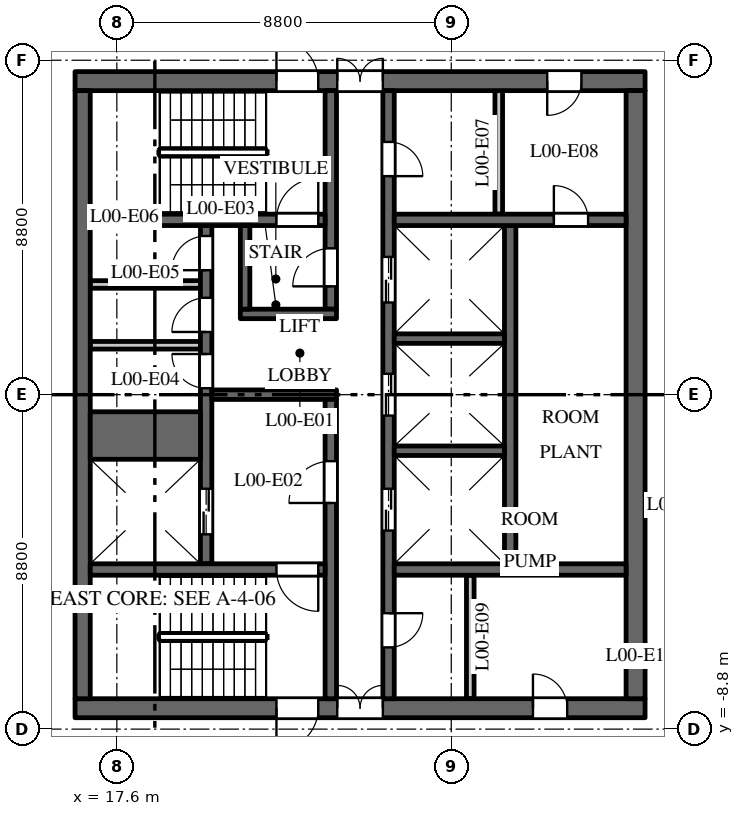
"""IFC4 building model, lengths in metres.
Left out: names, types, materials, properties, quantities, classifications, styles, units other than length and angle.
Written with IfcOpenShell. Run it as: python <this file> out.ifc"""

import sys

from ifc_helpers import new_model, si_unit, direction, frame, frame_2d, origin, place, context, subcontext, project, spatial, rectangle, extrude, element, fill, save


model = new_model("IFC4")
c1 = context("Model", 3, precision=1e-05, world=origin(), true_north=direction((0.0, 1.0)))
c2 = subcontext(c1, "Body", "Model", "MODEL_VIEW")
j1 = project(units=[si_unit("LENGTHUNIT", "METRE"), si_unit("PLANEANGLEUNIT", "RADIAN")], contexts=[c1])
p1 = place(None, origin())
s1 = spatial("IfcSite", under=j1, at=p1, CompositionType="ELEMENT")
p2 = place(p1, origin())
s2 = spatial("IfcBuilding", under=s1, at=p2, CompositionType="ELEMENT")
p3 = place(p2, origin())
s3 = spatial("IfcBuildingStorey", under=s2, at=p3, CompositionType="ELEMENT", Elevation=0.0)
p4 = place(p3, frame((16.5, 8.25, 0.0), z_axis=(0.0, 0.0, 1.0), x_axis=(1.0, 0.0, 0.0)))
e1 = element("IfcWall", 1, at=p4, inside=s3, PredefinedType="SHEAR", context=c2, shape_type="SweptSolid", body=[
    extrude(rectangle(XDim=15.0, YDim=0.5, at=frame_2d((7.5, 0.0))), origin(), (0.0, 0.0, 1.0), 7.25),
])
p5 = place(p4, frame((6.9, 0.0, 0.0)))
e2 = element("IfcOpeningElement", 2, at=p5, cuts=e1, PredefinedType="OPENING", context=c2, shape_type="SweptSolid", body=[
    extrude(rectangle(XDim=1.2, YDim=2.1, at=frame_2d((0.6, 1.05))), frame((0.0, 0.26, 0.0), z_axis=(0.0, -1.0, 0.0), x_axis=(1.0, 0.0, 0.0)), (0.0, 0.0, 1.0), 0.52),
])
p6 = place(p4, frame((5.3, 0.0, 0.0)))
e3 = element("IfcOpeningElement", 3, at=p6, cuts=e1, PredefinedType="OPENING", context=c2, shape_type="SweptSolid", body=[
    extrude(rectangle(XDim=1.1, YDim=2.1, at=frame_2d((0.55, 1.05))), frame((0.0, 0.26, 0.0), z_axis=(0.0, -1.0, 0.0), x_axis=(1.0, 0.0, 0.0)), (0.0, 0.0, 1.0), 0.52),
])
p7 = place(p4, frame((12.425, 0.0, 0.0)))
e4 = element("IfcOpeningElement", 4, at=p7, cuts=e1, PredefinedType="OPENING", context=c2, shape_type="SweptSolid", body=[
    extrude(rectangle(XDim=0.9, YDim=2.1, at=frame_2d((0.45, 1.05))), frame((0.0, 0.26, 0.0), z_axis=(0.0, -1.0, 0.0), x_axis=(1.0, 0.0, 0.0)), (0.0, 0.0, 1.0), 0.52),
])
p8 = place(p3, frame((16.5, -8.25, 0.0), z_axis=(0.0, 0.0, 1.0), x_axis=(1.0, 0.0, 0.0)))
e5 = element("IfcWall", 5, at=p8, inside=s3, PredefinedType="SHEAR", context=c2, shape_type="SweptSolid", body=[
    extrude(rectangle(XDim=15.0, YDim=0.5, at=frame_2d((7.5, 0.0))), origin(), (0.0, 0.0, 1.0), 7.25),
])
p9 = place(p8, frame((6.9, 0.0, 0.0)))
e6 = element("IfcOpeningElement", 6, at=p9, cuts=e5, PredefinedType="OPENING", context=c2, shape_type="SweptSolid", body=[
    extrude(rectangle(XDim=1.2, YDim=2.1, at=frame_2d((0.6, 1.05))), frame((0.0, 0.26, 0.0), z_axis=(0.0, -1.0, 0.0), x_axis=(1.0, 0.0, 0.0)), (0.0, 0.0, 1.0), 0.52),
])
p10 = place(p8, frame((5.3, 0.0, 0.0)))
e7 = element("IfcOpeningElement", 7, at=p10, cuts=e5, PredefinedType="OPENING", context=c2, shape_type="SweptSolid", body=[
    extrude(rectangle(XDim=1.1, YDim=2.1, at=frame_2d((0.55, 1.05))), frame((0.0, 0.26, 0.0), z_axis=(0.0, -1.0, 0.0), x_axis=(1.0, 0.0, 0.0)), (0.0, 0.0, 1.0), 0.52),
])
p11 = place(p8, frame((12.05, 0.0, 0.0)))
e8 = element("IfcOpeningElement", 8, at=p11, cuts=e5, PredefinedType="OPENING", context=c2, shape_type="SweptSolid", body=[
    extrude(rectangle(XDim=0.9, YDim=2.1, at=frame_2d((0.45, 1.05))), frame((0.0, 0.26, 0.0), z_axis=(0.0, -1.0, 0.0), x_axis=(1.0, 0.0, 0.0)), (0.0, 0.0, 1.0), 0.52),
])
for number, where, z_axis, x_axis in (
    (9, (16.9, 1.3, 0.0), (0.0, 0.0, 1.0), (1.0, 0.0, 0.0)),
    (10, (16.9, 2.9, 0.0), (0.0, 0.0, 1.0), (1.0, 0.0, 0.0)),
):
    element("IfcWall", number, at=place(p3, frame(where, z_axis=z_axis, x_axis=x_axis)), inside=s3, PredefinedType="PARTITIONING", context=c2, shape_type="SweptSolid", body=[
        extrude(rectangle(XDim=2.9, YDim=0.2, at=frame_2d((1.45, 0.0))), origin(), (0.0, 0.0, 1.0), 7.25),
    ])
p12 = place(p3, frame((27.95, -4.45, 0.0), z_axis=(0.0, 0.0, 1.0), x_axis=(0.0, 1.0, 0.0)))
e11 = element("IfcWall", 11, at=p12, inside=s3, PredefinedType="SHEAR", context=c2, shape_type="SweptSolid", body=[
    extrude(rectangle(XDim=8.9, YDim=0.3, at=frame_2d((4.45, 0.0))), origin(), (0.0, 0.0, 1.0), 7.25),
])
p13 = place(p3, frame((19.95, -4.45, 0.0), z_axis=(0.0, 0.0, 1.0), x_axis=(0.0, 1.0, 0.0)))
e12 = element("IfcWall", 12, at=p13, inside=s3, PredefinedType="SHEAR", context=c2, shape_type="SweptSolid", body=[
    extrude(rectangle(XDim=8.9, YDim=0.3, at=frame_2d((4.45, 0.0))), origin(), (0.0, 0.0, 1.0), 7.25),
])
p14 = place(p13, frame((0.775, 0.0, 0.0)))
e13 = element("IfcOpeningElement", 13, at=p14, cuts=e12, PredefinedType="OPENING", context=c2, shape_type="SweptSolid", body=[
    extrude(rectangle(XDim=1.2, YDim=2.1, at=frame_2d((0.6, 1.05))), frame((0.0, 0.16, 0.0), z_axis=(0.0, -1.0, 0.0), x_axis=(1.0, 0.0, 0.0)), (0.0, 0.0, 1.0), 0.32),
])
p15 = place(p13, frame((4.62, 0.0, 0.0)))
e14 = element("IfcOpeningElement", 14, at=p15, cuts=e12, PredefinedType="OPENING", context=c2, shape_type="SweptSolid", body=[
    extrude(rectangle(XDim=0.9, YDim=2.1, at=frame_2d((0.45, 1.05))), frame((0.0, 0.16, 0.0), z_axis=(0.0, -1.0, 0.0), x_axis=(1.0, 0.0, 0.0)), (0.0, 0.0, 1.0), 0.32),
])
p16 = place(p13, frame((6.1, 0.0, 0.0)))
e15 = element("IfcOpeningElement", 15, at=p16, cuts=e12, PredefinedType="OPENING", context=c2, shape_type="SweptSolid", body=[
    extrude(rectangle(XDim=0.9, YDim=2.1, at=frame_2d((0.45, 1.05))), frame((0.0, 0.16, 0.0), z_axis=(0.0, -1.0, 0.0), x_axis=(1.0, 0.0, 0.0)), (0.0, 0.0, 1.0), 0.32),
])
p17 = place(p13, frame((7.725, 0.0, 0.0)))
e16 = element("IfcOpeningElement", 16, at=p17, cuts=e12, PredefinedType="OPENING", context=c2, shape_type="SweptSolid", body=[
    extrude(rectangle(XDim=0.9, YDim=2.1, at=frame_2d((0.45, 1.05))), frame((0.0, 0.16, 0.0), z_axis=(0.0, -1.0, 0.0), x_axis=(1.0, 0.0, 0.0)), (0.0, 0.0, 1.0), 0.32),
])
p18 = place(p3, frame((24.75, -8.0, 0.0), z_axis=(0.0, 0.0, 1.0), x_axis=(0.0, 1.0, 0.0)))
e17 = element("IfcWall", 17, at=p18, inside=s3, PredefinedType="SHEAR", context=c2, shape_type="SweptSolid", body=[
    extrude(rectangle(XDim=16.0, YDim=0.3, at=frame_2d((8.0, 0.0))), origin(), (0.0, 0.0, 1.0), 7.25),
])
p19 = place(p18, frame((4.425, 0.0, 0.0)))
e18 = element("IfcOpeningElement", 18, at=p19, cuts=e17, PredefinedType="OPENING", context=c2, shape_type="SweptSolid", body=[
    extrude(rectangle(XDim=1.1, YDim=2.1, at=frame_2d((0.55, 1.05))), frame((0.0, 0.16, 0.0), z_axis=(0.0, -1.0, 0.0), x_axis=(1.0, 0.0, 0.0)), (0.0, 0.0, 1.0), 0.32),
])
p20 = place(p18, frame((7.45, 0.0, 0.0)))
e19 = element("IfcOpeningElement", 19, at=p20, cuts=e17, PredefinedType="OPENING", context=c2, shape_type="SweptSolid", body=[
    extrude(rectangle(XDim=1.1, YDim=2.1, at=frame_2d((0.55, 1.05))), frame((0.0, 0.16, 0.0), z_axis=(0.0, -1.0, 0.0), x_axis=(1.0, 0.0, 0.0)), (0.0, 0.0, 1.0), 0.32),
])
p21 = place(p18, frame((10.425, 0.0, 0.0)))
e20 = element("IfcOpeningElement", 20, at=p21, cuts=e17, PredefinedType="OPENING", context=c2, shape_type="SweptSolid", body=[
    extrude(rectangle(XDim=1.2, YDim=2.1, at=frame_2d((0.6, 1.05))), frame((0.0, 0.16, 0.0), z_axis=(0.0, -1.0, 0.0), x_axis=(1.0, 0.0, 0.0)), (0.0, 0.0, 1.0), 0.32),
])
p22 = place(p18, frame((13.75, 0.0, 0.0)))
e21 = element("IfcOpeningElement", 21, at=p22, cuts=e17, PredefinedType="OPENING", context=c2, shape_type="SweptSolid", body=[
    extrude(rectangle(XDim=0.9, YDim=2.1, at=frame_2d((0.45, 1.05))), frame((0.0, 0.16, 0.0), z_axis=(0.0, -1.0, 0.0), x_axis=(1.0, 0.0, 0.0)), (0.0, 0.0, 1.0), 0.32),
])
p23 = place(p18, frame((1.35, 0.0, 0.0)))
e22 = element("IfcOpeningElement", 22, at=p23, cuts=e17, PredefinedType="OPENING", context=c2, shape_type="SweptSolid", body=[
    extrude(rectangle(XDim=0.9, YDim=2.1, at=frame_2d((0.45, 1.05))), frame((0.0, 0.16, 0.0), z_axis=(0.0, -1.0, 0.0), x_axis=(1.0, 0.0, 0.0)), (0.0, 0.0, 1.0), 0.32),
])
p24 = place(p3, frame((20.1, 0.0, 0.0), z_axis=(0.0, 0.0, 1.0), x_axis=(1.0, 0.0, 0.0)))
e23 = element("IfcWall", 23, at=p24, inside=s3, PredefinedType="SHEAR", context=c2, shape_type="SweptSolid", body=[
    extrude(rectangle(XDim=3.28, YDim=0.25, at=frame_2d((1.64, 0.0))), origin(), (0.0, 0.0, 1.0), 7.25),
])
p25 = place(p3, frame((16.7, -8.0, 0.0), z_axis=(0.0, 0.0, 1.0), x_axis=(0.0, 1.0, 0.0)))
e24 = element("IfcWall", 24, at=p25, inside=s3, PredefinedType="SHEAR", context=c2, shape_type="SweptSolid", body=[
    extrude(rectangle(XDim=16.0, YDim=0.4, at=frame_2d((8.0, 0.0))), origin(), (0.0, 0.0, 1.0), 7.25),
])
p26 = place(p3, frame((31.25, -8.0, 0.0), z_axis=(0.0, 0.0, 1.0), x_axis=(0.0, 1.0, 0.0)))
e25 = element("IfcWall", 25, at=p26, inside=s3, PredefinedType="SHEAR", context=c2, shape_type="SweptSolid", body=[
    extrude(rectangle(XDim=16.0, YDim=0.5, at=frame_2d((8.0, 0.0))), origin(), (0.0, 0.0, 1.0), 7.25),
])
p27 = place(p3, frame((24.9, 4.6, 0.0), z_axis=(0.0, 0.0, 1.0), x_axis=(1.0, 0.0, 0.0)))
e26 = element("IfcWall", 26, at=p27, inside=s3, PredefinedType="SHEAR", context=c2, shape_type="SweptSolid", body=[
    extrude(rectangle(XDim=6.1, YDim=0.3, at=frame_2d((3.05, 0.0))), origin(), (0.0, 0.0, 1.0), 7.25),
])
p28 = place(p27, frame((4.2, 0.0, 0.0)))
e27 = element("IfcOpeningElement", 27, at=p28, cuts=e26, PredefinedType="OPENING", context=c2, shape_type="SweptSolid", body=[
    extrude(rectangle(XDim=0.9, YDim=2.1, at=frame_2d((0.45, 1.05))), frame((0.0, 0.16, 0.0), z_axis=(0.0, -1.0, 0.0), x_axis=(1.0, 0.0, 0.0)), (0.0, 0.0, 1.0), 0.32),
])
for number, where, z_axis, x_axis in (
    (28, (27.65, 4.75, 0.0), (0.0, 0.0, 1.0), (0.0, 1.0, 0.0)),
    (29, (26.9, -8.0, 0.0), (0.0, 0.0, 1.0), (0.0, 1.0, 0.0)),
):
    element("IfcWall", number, at=place(p3, frame(where, z_axis=z_axis, x_axis=x_axis)), inside=s3, PredefinedType="PARTITIONING", context=c2, shape_type="SweptSolid", body=[
        extrude(rectangle(XDim=3.25, YDim=0.2, at=frame_2d((1.625, 0.0))), origin(), (0.0, 0.0, 1.0), 7.25),
    ])
p29 = place(p3, frame((24.9, -4.6, 0.0), z_axis=(0.0, 0.0, 1.0), x_axis=(1.0, 0.0, 0.0)))
e30 = element("IfcWall", 30, at=p29, inside=s3, PredefinedType="SHEAR", context=c2, shape_type="SweptSolid", body=[
    extrude(rectangle(XDim=6.1, YDim=0.3, at=frame_2d((3.05, 0.0))), origin(), (0.0, 0.0, 1.0), 7.25),
])
p30 = place(p3, frame((16.9, -1.075, 0.0), z_axis=(0.0, 0.0, 1.0), x_axis=(1.0, 0.0, 0.0)))
e31 = element("IfcWall", 31, at=p30, inside=s3, PredefinedType="SHEAR", context=c2, shape_type="SweptSolid", body=[
    extrude(rectangle(XDim=2.9, YDim=1.25, at=frame_2d((1.45, 0.0))), origin(), (0.0, 0.0, 1.0), 7.25),
])
for number, where, z_axis, x_axis in (
    (32, (24.9, -1.475, 0.0), (0.0, 0.0, 1.0), (1.0, 0.0, 0.0)),
    (33, (24.9, 1.475, 0.0), (0.0, 0.0, 1.0), (1.0, 0.0, 0.0)),
):
    element("IfcWall", number, at=place(p3, frame(where, z_axis=z_axis, x_axis=x_axis)), inside=s3, PredefinedType="SHEAR", context=c2, shape_type="SweptSolid", body=[
        extrude(rectangle(XDim=2.9, YDim=0.25, at=frame_2d((1.45, 0.0))), origin(), (0.0, 0.0, 1.0), 7.25),
    ])
p31 = place(p3, frame((23.23, 2.25, 0.0), z_axis=(0.0, 0.0, 1.0), x_axis=(0.0, 1.0, 0.0)))
e34 = element("IfcWall", 34, at=p31, inside=s3, PredefinedType="SHEAR", context=c2, shape_type="SweptSolid", body=[
    extrude(rectangle(XDim=5.75, YDim=0.3, at=frame_2d((2.875, 0.0))), origin(), (0.0, 0.0, 1.0), 7.25),
])
p32 = place(p31, frame((0.6, 0.0, 0.0)))
e35 = element("IfcOpeningElement", 35, at=p32, cuts=e34, PredefinedType="OPENING", context=c2, shape_type="SweptSolid", body=[
    extrude(rectangle(XDim=1.0, YDim=2.1, at=frame_2d((0.5, 1.05))), frame((0.0, 0.16, 0.0), z_axis=(0.0, -1.0, 0.0), x_axis=(1.0, 0.0, 0.0)), (0.0, 0.0, 1.0), 0.32),
])
p33 = place(p3, frame((23.23, -8.0, 0.0), z_axis=(0.0, 0.0, 1.0), x_axis=(0.0, 1.0, 0.0)))
e36 = element("IfcWall", 36, at=p33, inside=s3, PredefinedType="SHEAR", context=c2, shape_type="SweptSolid", body=[
    extrude(rectangle(XDim=7.875, YDim=0.3, at=frame_2d((3.938, 0.0))), origin(), (0.0, 0.0, 1.0), 7.25),
])
p34 = place(p33, frame((5.15, 0.0, 0.0)))
e37 = element("IfcOpeningElement", 37, at=p34, cuts=e36, PredefinedType="OPENING", context=c2, shape_type="SweptSolid", body=[
    extrude(rectangle(XDim=1.1, YDim=2.1, at=frame_2d((0.55, 1.05))), frame((0.0, 0.16, 0.0), z_axis=(0.0, -1.0, 0.0), x_axis=(1.0, 0.0, 0.0)), (0.0, 0.0, 1.0), 0.32),
])
p35 = place(p3, frame((16.9, 4.6, 0.0), z_axis=(0.0, 0.0, 1.0), x_axis=(1.0, 0.0, 0.0)))
e38 = element("IfcWall", 38, at=p35, inside=s3, PredefinedType="SHEAR", context=c2, shape_type="SweptSolid", body=[
    extrude(rectangle(XDim=6.18, YDim=0.3, at=frame_2d((3.09, 0.0))), origin(), (0.0, 0.0, 1.0), 7.25),
])
p36 = place(p35, frame((4.9, 0.0, 0.0)))
e39 = element("IfcOpeningElement", 39, at=p36, cuts=e38, PredefinedType="OPENING", context=c2, shape_type="SweptSolid", body=[
    extrude(rectangle(XDim=1.1, YDim=2.1, at=frame_2d((0.55, 1.05))), frame((0.0, 0.16, 0.0), z_axis=(0.0, -1.0, 0.0), x_axis=(1.0, 0.0, 0.0)), (0.0, 0.0, 1.0), 0.32),
])
p37 = place(p3, frame((16.9, -4.6, 0.0), z_axis=(0.0, 0.0, 1.0), x_axis=(1.0, 0.0, 0.0)))
e40 = element("IfcWall", 40, at=p37, inside=s3, PredefinedType="SHEAR", context=c2, shape_type="SweptSolid", body=[
    extrude(rectangle(XDim=6.18, YDim=0.3, at=frame_2d((3.09, 0.0))), origin(), (0.0, 0.0, 1.0), 7.25),
])
p38 = place(p37, frame((4.9, 0.0, 0.0)))
e41 = element("IfcOpeningElement", 41, at=p38, cuts=e40, PredefinedType="OPENING", context=c2, shape_type="SweptSolid", body=[
    extrude(rectangle(XDim=1.1, YDim=2.1, at=frame_2d((0.55, 1.05))), frame((0.0, 0.16, 0.0), z_axis=(0.0, -1.0, 0.0), x_axis=(1.0, 0.0, 0.0)), (0.0, 0.0, 1.0), 0.32),
])
p39 = place(p3, frame((20.85, 2.125, 0.0), z_axis=(0.0, 0.0, 1.0), x_axis=(1.0, 0.0, 0.0)))
e42 = element("IfcWall", 42, at=p39, inside=s3, PredefinedType="SHEAR", context=c2, shape_type="SweptSolid", body=[
    extrude(rectangle(XDim=2.53, YDim=0.25, at=frame_2d((1.265, 0.0))), origin(), (0.0, 0.0, 1.0), 7.25),
])
p40 = place(p3, frame((20.975, 2.25, 0.0), z_axis=(0.0, 0.0, 1.0), x_axis=(0.0, 1.0, 0.0)))
e43 = element("IfcWall", 43, at=p40, inside=s3, PredefinedType="SHEAR", context=c2, shape_type="SweptSolid", body=[
    extrude(rectangle(XDim=2.2, YDim=0.25, at=frame_2d((1.1, 0.0))), origin(), (0.0, 0.0, 1.0), 7.25),
])
p41 = place(p14, origin())
e44 = element("IfcDoor", 44, at=p41, inside=s3, OperationType="DOUBLE_DOOR_SLIDING", PredefinedType="DOOR", context=c2, shape_type="SweptSolid", body=[
    extrude(rectangle(XDim=1.2, YDim=2.1, at=frame_2d((0.6, 1.05))), frame((0.0, 0.025, 0.0), z_axis=(0.0, -1.0, 0.0), x_axis=(1.0, 0.0, 0.0)), (0.0, 0.0, 1.0), 0.05),
])
fill(e13, e44)
p42 = place(p19, origin())
e45 = element("IfcDoor", 45, at=p42, inside=s3, OperationType="DOUBLE_DOOR_SLIDING", PredefinedType="DOOR", context=c2, shape_type="SweptSolid", body=[
    extrude(rectangle(XDim=1.1, YDim=2.1, at=frame_2d((0.55, 1.05))), frame((0.0, 0.025, 0.0), z_axis=(0.0, -1.0, 0.0), x_axis=(1.0, 0.0, 0.0)), (0.0, 0.0, 1.0), 0.05),
])
fill(e18, e45)
p43 = place(p20, origin())
e46 = element("IfcDoor", 46, at=p43, inside=s3, OperationType="DOUBLE_DOOR_SLIDING", PredefinedType="DOOR", context=c2, shape_type="SweptSolid", body=[
    extrude(rectangle(XDim=1.1, YDim=2.1, at=frame_2d((0.55, 1.05))), frame((0.0, 0.025, 0.0), z_axis=(0.0, -1.0, 0.0), x_axis=(1.0, 0.0, 0.0)), (0.0, 0.0, 1.0), 0.05),
])
fill(e19, e46)
p44 = place(p21, origin())
e47 = element("IfcDoor", 47, at=p44, inside=s3, OperationType="DOUBLE_DOOR_SLIDING", PredefinedType="DOOR", context=c2, shape_type="SweptSolid", body=[
    extrude(rectangle(XDim=1.2, YDim=2.1, at=frame_2d((0.6, 1.05))), frame((0.0, 0.025, 0.0), z_axis=(0.0, -1.0, 0.0), x_axis=(1.0, 0.0, 0.0)), (0.0, 0.0, 1.0), 0.05),
])
fill(e20, e47)
p45 = place(p36, origin())
e48 = element("IfcDoor", 48, at=p45, inside=s3, OperationType="SINGLE_SWING_LEFT", PredefinedType="DOOR", context=c2, shape_type="SweptSolid", body=[
    extrude(rectangle(XDim=1.1, YDim=2.1, at=frame_2d((0.55, 1.05))), frame((0.0, 0.025, 0.0), z_axis=(0.0, -1.0, 0.0), x_axis=(1.0, 0.0, 0.0)), (0.0, 0.0, 1.0), 0.05),
])
fill(e39, e48)
p46 = place(p38, origin())
e49 = element("IfcDoor", 49, at=p46, inside=s3, OperationType="SINGLE_SWING_RIGHT", PredefinedType="DOOR", context=c2, shape_type="SweptSolid", body=[
    extrude(rectangle(XDim=1.1, YDim=2.1, at=frame_2d((0.55, 1.05))), frame((0.0, 0.025, 0.0), z_axis=(0.0, -1.0, 0.0), x_axis=(1.0, 0.0, 0.0)), (0.0, 0.0, 1.0), 0.05),
])
fill(e41, e49)
p47 = place(p34, origin())
e50 = element("IfcDoor", 50, at=p47, inside=s3, OperationType="SINGLE_SWING_RIGHT", PredefinedType="DOOR", context=c2, shape_type="SweptSolid", body=[
    extrude(rectangle(XDim=1.1, YDim=2.1, at=frame_2d((0.55, 1.05))), frame((0.0, 0.025, 0.0), z_axis=(0.0, -1.0, 0.0), x_axis=(1.0, 0.0, 0.0)), (0.0, 0.0, 1.0), 0.05),
])
fill(e37, e50)
p48 = place(p32, origin())
e51 = element("IfcDoor", 51, at=p48, inside=s3, OperationType="SINGLE_SWING_RIGHT", PredefinedType="DOOR", context=c2, shape_type="SweptSolid", body=[
    extrude(rectangle(XDim=1.0, YDim=2.1, at=frame_2d((0.5, 1.05))), frame((0.0, 0.025, 0.0), z_axis=(0.0, -1.0, 0.0), x_axis=(1.0, 0.0, 0.0)), (0.0, 0.0, 1.0), 0.05),
])
fill(e35, e51)
p49 = place(p5, origin())
e52 = element("IfcDoor", 52, at=p49, inside=s3, OperationType="DOUBLE_DOOR_DOUBLE_SWING", PredefinedType="DOOR", context=c2, shape_type="SweptSolid", body=[
    extrude(rectangle(XDim=1.2, YDim=2.1, at=frame_2d((0.6, 1.05))), frame((0.0, 0.025, 0.0), z_axis=(0.0, -1.0, 0.0), x_axis=(1.0, 0.0, 0.0)), (0.0, 0.0, 1.0), 0.05),
])
fill(e2, e52)
p50 = place(p9, origin())
e53 = element("IfcDoor", 53, at=p50, inside=s3, OperationType="DOUBLE_DOOR_DOUBLE_SWING", PredefinedType="DOOR", context=c2, shape_type="SweptSolid", body=[
    extrude(rectangle(XDim=1.2, YDim=2.1, at=frame_2d((0.6, 1.05))), frame((0.0, 0.025, 0.0), z_axis=(0.0, -1.0, 0.0), x_axis=(1.0, 0.0, 0.0)), (0.0, 0.0, 1.0), 0.05),
])
fill(e6, e53)
p51 = place(p6, origin())
e54 = element("IfcDoor", 54, at=p51, inside=s3, OperationType="SINGLE_SWING_RIGHT", PredefinedType="DOOR", context=c2, shape_type="SweptSolid", body=[
    extrude(rectangle(XDim=1.1, YDim=2.1, at=frame_2d((0.55, 1.05))), frame((0.0, 0.025, 0.0), z_axis=(0.0, -1.0, 0.0), x_axis=(1.0, 0.0, 0.0)), (0.0, 0.0, 1.0), 0.05),
])
fill(e3, e54)
p52 = place(p10, origin())
e55 = element("IfcDoor", 55, at=p52, inside=s3, OperationType="SINGLE_SWING_LEFT", PredefinedType="DOOR", context=c2, shape_type="SweptSolid", body=[
    extrude(rectangle(XDim=1.1, YDim=2.1, at=frame_2d((0.55, 1.05))), frame((0.0, 0.025, 0.0), z_axis=(0.0, -1.0, 0.0), x_axis=(1.0, 0.0, 0.0)), (0.0, 0.0, 1.0), 0.05),
])
fill(e7, e55)
p53 = place(p15, origin())
e56 = element("IfcDoor", 56, at=p53, inside=s3, OperationType="SINGLE_SWING_LEFT", PredefinedType="DOOR", context=c2, shape_type="SweptSolid", body=[
    extrude(rectangle(XDim=0.9, YDim=2.1, at=frame_2d((0.45, 1.05))), frame((0.0, 0.025, 0.0), z_axis=(0.0, -1.0, 0.0), x_axis=(1.0, 0.0, 0.0)), (0.0, 0.0, 1.0), 0.05),
])
fill(e14, e56)
p54 = place(p16, origin())
e57 = element("IfcDoor", 57, at=p54, inside=s3, OperationType="SINGLE_SWING_RIGHT", PredefinedType="DOOR", context=c2, shape_type="SweptSolid", body=[
    extrude(rectangle(XDim=0.9, YDim=2.1, at=frame_2d((0.45, 1.05))), frame((0.0, 0.025, 0.0), z_axis=(0.0, -1.0, 0.0), x_axis=(1.0, 0.0, 0.0)), (0.0, 0.0, 1.0), 0.05),
])
fill(e15, e57)
p55 = place(p17, origin())
e58 = element("IfcDoor", 58, at=p55, inside=s3, OperationType="SINGLE_SWING_RIGHT", PredefinedType="DOOR", context=c2, shape_type="SweptSolid", body=[
    extrude(rectangle(XDim=0.9, YDim=2.1, at=frame_2d((0.45, 1.05))), frame((0.0, 0.025, 0.0), z_axis=(0.0, -1.0, 0.0), x_axis=(1.0, 0.0, 0.0)), (0.0, 0.0, 1.0), 0.05),
])
fill(e16, e58)
p56 = place(p22, origin())
e59 = element("IfcDoor", 59, at=p56, inside=s3, OperationType="SINGLE_SWING_LEFT", PredefinedType="DOOR", context=c2, shape_type="SweptSolid", body=[
    extrude(rectangle(XDim=0.9, YDim=2.1, at=frame_2d((0.45, 1.05))), frame((0.0, 0.025, 0.0), z_axis=(0.0, -1.0, 0.0), x_axis=(1.0, 0.0, 0.0)), (0.0, 0.0, 1.0), 0.05),
])
fill(e21, e59)
p57 = place(p7, origin())
e60 = element("IfcDoor", 60, at=p57, inside=s3, OperationType="SINGLE_SWING_LEFT", PredefinedType="DOOR", context=c2, shape_type="SweptSolid", body=[
    extrude(rectangle(XDim=0.9, YDim=2.1, at=frame_2d((0.45, 1.05))), frame((0.0, 0.025, 0.0), z_axis=(0.0, -1.0, 0.0), x_axis=(1.0, 0.0, 0.0)), (0.0, 0.0, 1.0), 0.05),
])
fill(e4, e60)
p58 = place(p23, origin())
e61 = element("IfcDoor", 61, at=p58, inside=s3, OperationType="SINGLE_SWING_RIGHT", PredefinedType="DOOR", context=c2, shape_type="SweptSolid", body=[
    extrude(rectangle(XDim=0.9, YDim=2.1, at=frame_2d((0.45, 1.05))), frame((0.0, 0.025, 0.0), z_axis=(0.0, -1.0, 0.0), x_axis=(1.0, 0.0, 0.0)), (0.0, 0.0, 1.0), 0.05),
])
fill(e22, e61)
p59 = place(p11, origin())
e62 = element("IfcDoor", 62, at=p59, inside=s3, OperationType="SINGLE_SWING_RIGHT", PredefinedType="DOOR", context=c2, shape_type="SweptSolid", body=[
    extrude(rectangle(XDim=0.9, YDim=2.1, at=frame_2d((0.45, 1.05))), frame((0.0, 0.025, 0.0), z_axis=(0.0, -1.0, 0.0), x_axis=(1.0, 0.0, 0.0)), (0.0, 0.0, 1.0), 0.05),
])
fill(e8, e62)
p60 = place(p28, origin())
e63 = element("IfcDoor", 63, at=p60, inside=s3, OperationType="SINGLE_SWING_RIGHT", PredefinedType="DOOR", context=c2, shape_type="SweptSolid", body=[
    extrude(rectangle(XDim=0.9, YDim=2.1, at=frame_2d((0.45, 1.05))), frame((0.0, 0.025, 0.0), z_axis=(0.0, -1.0, 0.0), x_axis=(1.0, 0.0, 0.0)), (0.0, 0.0, 1.0), 0.05),
])
fill(e27, e63)
save(model, sys.argv[1])
